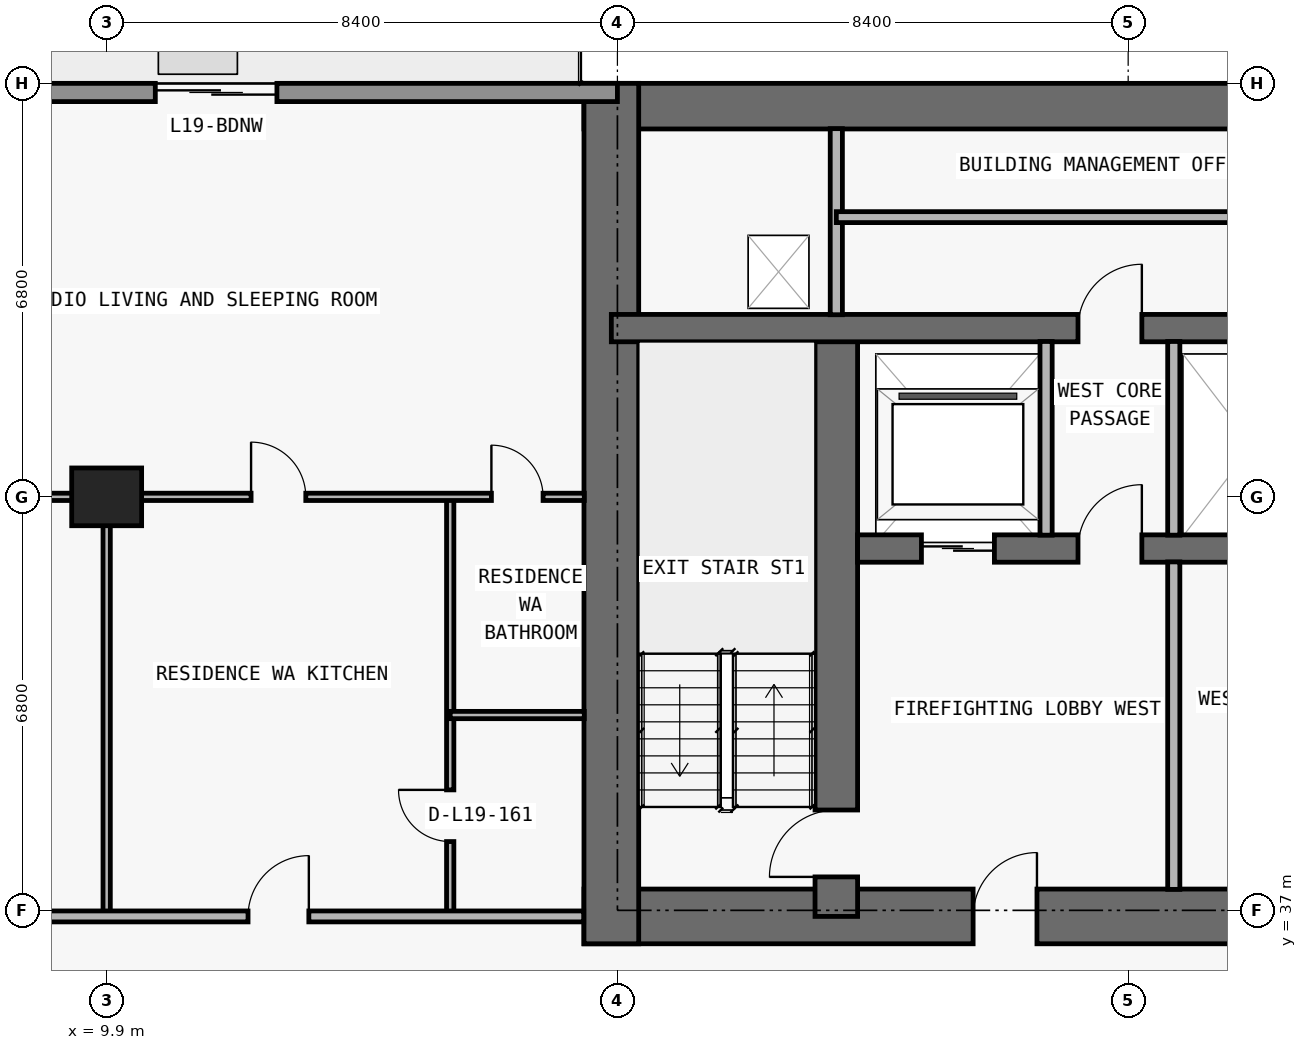
"""IFC4 building model, lengths in metres.
Left out: names, types, materials, properties, quantities, classifications, styles, units other than length and angle.
Written with IfcOpenShell. Run it as: python <this file> out.ifc"""

import sys

from ifc_helpers import new_model, si_unit, direction, frame, frame_2d, origin, origin_2d, place, context, subcontext, project, spatial, rectangle, extrude, element, fill, save


model = new_model("IFC4")
c1 = context("Model", 3, precision=1e-05, world=origin(), true_north=direction((0.0, 1.0)))
c2 = subcontext(c1, "Body", "Model", "MODEL_VIEW")
j1 = project(units=[si_unit("LENGTHUNIT", "METRE"), si_unit("PLANEANGLEUNIT", "RADIAN")], contexts=[c1])
p1 = place(None, origin())
s1 = spatial("IfcSite", under=j1, at=p1, CompositionType="ELEMENT")
p2 = place(p1, origin())
s2 = spatial("IfcBuilding", under=s1, at=p2, CompositionType="ELEMENT")
p3 = place(p2, frame((0.0, 0.0, 72.9)))
s3 = spatial("IfcBuildingStorey", under=s2, at=p3, CompositionType="ELEMENT", Elevation=72.9)
p4 = place(p3, frame((9.9, 43.8, 0.0), z_axis=(0.0, 0.0, 1.0), x_axis=(1.0, 0.0, 0.0)))
e1 = element("IfcColumn", 1, at=p4, inside=s3, PredefinedType="COLUMN", context=c2, shape_type="SweptSolid", body=[
    extrude(rectangle(XDim=1.15, YDim=0.95, at=origin_2d()), origin(), (0.0, 0.0, 1.0), 3.05),
])
p5 = place(p3, frame((17.75, 36.9, 0.0), z_axis=(0.0, 0.0, 1.0), x_axis=(1.0, 0.0, 0.0)))
e2 = element("IfcWall", 2, at=p5, inside=s3, PredefinedType="SHEAR", context=c2, shape_type="SweptSolid", body=[
    extrude(rectangle(XDim=42.3, YDim=0.9, at=frame_2d((21.15, 0.0))), origin(), (0.0, 0.0, 1.0), 3.05),
])
p6 = place(p5, frame((14.55, 0.0, 0.0)))
e3 = element("IfcOpeningElement", 3, at=p6, cuts=e2, PredefinedType="OPENING", context=c2, shape_type="SweptSolid", body=[
    extrude(rectangle(XDim=1.1, YDim=2.15, at=frame_2d((0.55, 1.075))), frame((0.0, 0.46, 0.0), z_axis=(0.0, -1.0, 0.0), x_axis=(1.0, 0.0, 0.0)), (0.0, 0.0, 1.0), 0.92),
])
p7 = place(p5, frame((6.4, 0.0, 0.0)))
e4 = element("IfcOpeningElement", 4, at=p7, cuts=e2, PredefinedType="OPENING", context=c2, shape_type="SweptSolid", body=[
    extrude(rectangle(XDim=1.05, YDim=2.15, at=frame_2d((0.525, 1.075))), frame((0.0, 0.46, 0.0), z_axis=(0.0, -1.0, 0.0), x_axis=(1.0, 0.0, 0.0)), (0.0, 0.0, 1.0), 0.92),
])
p8 = place(p5, frame((34.9, 0.0, 0.0)))
e5 = element("IfcOpeningElement", 5, at=p8, cuts=e2, PredefinedType="OPENING", context=c2, shape_type="SweptSolid", body=[
    extrude(rectangle(XDim=1.05, YDim=2.15, at=frame_2d((0.525, 1.075))), frame((0.0, 0.46, 0.0), z_axis=(0.0, -1.0, 0.0), x_axis=(1.0, 0.0, 0.0)), (0.0, 0.0, 1.0), 0.92),
])
p9 = place(p5, frame((11.012, 0.0, 0.0)))
e6 = element("IfcOpeningElement", 6, at=p9, cuts=e2, PredefinedType="OPENING", context=c2, shape_type="SweptSolid", body=[
    extrude(rectangle(XDim=1.05, YDim=2.15, at=frame_2d((0.525, 1.075))), frame((0.0, 0.46, 0.0), z_axis=(0.0, -1.0, 0.0), x_axis=(1.0, 0.0, 0.0)), (0.0, 0.0, 1.0), 0.92),
])
p10 = place(p5, frame((24.25, 0.0, 0.0)))
e7 = element("IfcOpeningElement", 7, at=p10, cuts=e2, PredefinedType="OPENING", context=c2, shape_type="SweptSolid", body=[
    extrude(rectangle(XDim=1.05, YDim=2.15, at=frame_2d((0.525, 1.075))), frame((0.0, 0.46, 0.0), z_axis=(0.0, -1.0, 0.0), x_axis=(1.0, 0.0, 0.0)), (0.0, 0.0, 1.0), 0.92),
])
p11 = place(p3, frame((17.75, 50.225, 0.0), z_axis=(0.0, 0.0, 1.0), x_axis=(1.0, 0.0, 0.0)))
e8 = element("IfcWall", 8, at=p11, inside=s3, PredefinedType="SHEAR", context=c2, shape_type="SweptSolid", body=[
    extrude(rectangle(XDim=42.3, YDim=0.75, at=frame_2d((21.15, 0.0))), origin(), (0.0, 0.0, 1.0), 3.05),
])
p12 = place(p3, frame((18.2, 36.45, 0.0), z_axis=(0.0, 0.0, 1.0), x_axis=(0.0, 1.0, 0.0)))
e9 = element("IfcWall", 9, at=p12, inside=s3, PredefinedType="SHEAR", context=c2, shape_type="SweptSolid", body=[
    extrude(rectangle(XDim=14.15, YDim=0.9, at=frame_2d((7.075, 0.0))), origin(), (0.0, 0.0, 1.0), 3.05),
])
p13 = place(p3, frame((21.9, 36.9, 0.0), z_axis=(0.0, 0.0, 1.0), x_axis=(0.0, 1.0, 0.0)))
e10 = element("IfcWall", 10, at=p13, inside=s3, PredefinedType="SHEAR", context=c2, shape_type="SweptSolid", body=[
    extrude(rectangle(XDim=9.675, YDim=0.7, at=frame_2d((4.837, 0.0))), origin(), (0.0, 0.0, 1.0), 3.05),
])
p14 = place(p13, frame((0.65, 0.0, 0.0)))
e11 = element("IfcOpeningElement", 11, at=p14, cuts=e10, PredefinedType="OPENING", context=c2, shape_type="SweptSolid", body=[
    extrude(rectangle(XDim=1.1, YDim=2.15, at=frame_2d((0.55, 1.075))), frame((0.0, 0.36, 0.0), z_axis=(0.0, -1.0, 0.0), x_axis=(1.0, 0.0, 0.0)), (0.0, 0.0, 1.0), 0.72),
])
p15 = place(p3, frame((22.25, 42.95, 0.0), z_axis=(0.0, 0.0, 1.0), x_axis=(1.0, 0.0, 0.0)))
e12 = element("IfcWall", 12, at=p15, inside=s3, PredefinedType="SHEAR", context=c2, shape_type="SweptSolid", body=[
    extrude(rectangle(XDim=33.3, YDim=0.45, at=frame_2d((16.65, 0.0))), origin(), (0.0, 0.0, 1.0), 3.05),
])
p16 = place(p15, frame((1.05, 0.0, 0.0)))
e13 = element("IfcOpeningElement", 13, at=p16, cuts=e12, PredefinedType="OPENING", context=c2, shape_type="SweptSolid", body=[
    extrude(rectangle(XDim=1.2, YDim=2.2, at=frame_2d((0.6, 1.1))), frame((0.0, 0.235, 0.0), z_axis=(0.0, -1.0, 0.0), x_axis=(1.0, 0.0, 0.0)), (0.0, 0.0, 1.0), 0.47),
])
p17 = place(p15, frame((31.05, 0.0, 0.0)))
e14 = element("IfcOpeningElement", 14, at=p17, cuts=e12, PredefinedType="OPENING", context=c2, shape_type="SweptSolid", body=[
    extrude(rectangle(XDim=1.2, YDim=2.2, at=frame_2d((0.6, 1.1))), frame((0.0, 0.235, 0.0), z_axis=(0.0, -1.0, 0.0), x_axis=(1.0, 0.0, 0.0)), (0.0, 0.0, 1.0), 0.47),
])
p18 = place(p15, frame((13.5, 0.0, 0.0)))
e15 = element("IfcOpeningElement", 15, at=p18, cuts=e12, PredefinedType="OPENING", context=c2, shape_type="SweptSolid", body=[
    extrude(rectangle(XDim=1.1, YDim=2.2, at=frame_2d((0.55, 1.1))), frame((0.0, 0.235, 0.0), z_axis=(0.0, -1.0, 0.0), x_axis=(1.0, 0.0, 0.0)), (0.0, 0.0, 1.0), 0.47),
])
p19 = place(p15, frame((16.1, 0.0, 0.0)))
e16 = element("IfcOpeningElement", 16, at=p19, cuts=e12, PredefinedType="OPENING", context=c2, shape_type="SweptSolid", body=[
    extrude(rectangle(XDim=1.1, YDim=2.2, at=frame_2d((0.55, 1.1))), frame((0.0, 0.235, 0.0), z_axis=(0.0, -1.0, 0.0), x_axis=(1.0, 0.0, 0.0)), (0.0, 0.0, 1.0), 0.47),
])
p20 = place(p15, frame((18.7, 0.0, 0.0)))
e17 = element("IfcOpeningElement", 17, at=p20, cuts=e12, PredefinedType="OPENING", context=c2, shape_type="SweptSolid", body=[
    extrude(rectangle(XDim=1.1, YDim=2.2, at=frame_2d((0.55, 1.1))), frame((0.0, 0.235, 0.0), z_axis=(0.0, -1.0, 0.0), x_axis=(1.0, 0.0, 0.0)), (0.0, 0.0, 1.0), 0.47),
])
p21 = place(p15, frame((3.625, 0.0, 0.0)))
e18 = element("IfcOpeningElement", 18, at=p21, cuts=e12, PredefinedType="OPENING", context=c2, shape_type="SweptSolid", body=[
    extrude(rectangle(XDim=1.05, YDim=2.15, at=frame_2d((0.525, 1.075))), frame((0.0, 0.235, 0.0), z_axis=(0.0, -1.0, 0.0), x_axis=(1.0, 0.0, 0.0)), (0.0, 0.0, 1.0), 0.47),
])
p22 = place(p15, frame((28.675, 0.0, 0.0)))
e19 = element("IfcOpeningElement", 19, at=p22, cuts=e12, PredefinedType="OPENING", context=c2, shape_type="SweptSolid", body=[
    extrude(rectangle(XDim=1.05, YDim=2.15, at=frame_2d((0.525, 1.075))), frame((0.0, 0.235, 0.0), z_axis=(0.0, -1.0, 0.0), x_axis=(1.0, 0.0, 0.0)), (0.0, 0.0, 1.0), 0.47),
])
p23 = place(p3, frame((18.2, 46.575, 0.0), z_axis=(0.0, 0.0, 1.0), x_axis=(1.0, 0.0, 0.0)))
e20 = element("IfcWall", 20, at=p23, inside=s3, PredefinedType="SHEAR", context=c2, shape_type="SweptSolid", body=[
    extrude(rectangle(XDim=41.4, YDim=0.45, at=frame_2d((20.7, 0.0))), origin(), (0.0, 0.0, 1.0), 3.05),
])
p24 = place(p23, frame((7.675, 0.0, 0.0)))
e21 = element("IfcOpeningElement", 21, at=p24, cuts=e20, PredefinedType="OPENING", context=c2, shape_type="SweptSolid", body=[
    extrude(rectangle(XDim=1.05, YDim=2.15, at=frame_2d((0.525, 1.075))), frame((0.0, 0.235, 0.0), z_axis=(0.0, -1.0, 0.0), x_axis=(1.0, 0.0, 0.0)), (0.0, 0.0, 1.0), 0.47),
])
p25 = place(p23, frame((32.725, 0.0, 0.0)))
e22 = element("IfcOpeningElement", 22, at=p25, cuts=e20, PredefinedType="OPENING", context=c2, shape_type="SweptSolid", body=[
    extrude(rectangle(XDim=1.05, YDim=2.15, at=frame_2d((0.525, 1.075))), frame((0.0, 0.235, 0.0), z_axis=(0.0, -1.0, 0.0), x_axis=(1.0, 0.0, 0.0)), (0.0, 0.0, 1.0), 0.47),
])
p26 = place(p3, frame((5.1, 50.45, 0.0), z_axis=(0.0, 0.0, 1.0), x_axis=(1.0, 0.0, 0.0)))
e23 = element("IfcWall", 23, at=p26, inside=s3, PredefinedType="STANDARD", context=c2, shape_type="SweptSolid", body=[
    extrude(rectangle(XDim=13.2, YDim=0.3, at=frame_2d((6.6, 0.0))), origin(), (0.0, 0.0, 1.0), 3.05),
])
p27 = place(p26, frame((5.6, 0.0, 0.0)))
e24 = element("IfcOpeningElement", 24, at=p27, cuts=e23, PredefinedType="OPENING", context=c2, shape_type="SweptSolid", body=[
    extrude(rectangle(XDim=2.0, YDim=2.3, at=frame_2d((1.0, 1.15))), frame((0.0, 0.16, 0.0), z_axis=(0.0, -1.0, 0.0), x_axis=(1.0, 0.0, 0.0)), (0.0, 0.0, 1.0), 0.32),
])
p28 = place(p3, frame((9.9, 36.9, 0.0), z_axis=(0.0, 0.0, 1.0), x_axis=(0.0, 1.0, 0.0)))
e25 = element("IfcWall", 25, at=p28, inside=s3, PredefinedType="PARTITIONING", context=c2, shape_type="SweptSolid", body=[
    extrude(rectangle(XDim=6.9, YDim=0.12, at=frame_2d((3.45, 0.0))), origin(), (0.0, 0.0, 1.0), 2.11),
])
p29 = place(p3, frame((15.55, 36.9, 0.0), z_axis=(0.0, 0.0, 1.0), x_axis=(0.0, 1.0, 0.0)))
e26 = element("IfcWall", 26, at=p29, inside=s3, PredefinedType="PARTITIONING", context=c2, shape_type="SweptSolid", body=[
    extrude(rectangle(XDim=6.9, YDim=0.12, at=frame_2d((3.45, 0.0))), origin(), (0.0, 0.0, 1.0), 3.05),
])
p30 = place(p29, frame((1.231, 0.0, 0.0)))
e27 = element("IfcOpeningElement", 27, at=p30, cuts=e26, PredefinedType="OPENING", context=c2, shape_type="SweptSolid", body=[
    extrude(rectangle(XDim=0.85, YDim=2.1, at=frame_2d((0.425, 1.05))), frame((0.0, 0.07, 0.0), z_axis=(0.0, -1.0, 0.0), x_axis=(1.0, 0.0, 0.0)), (0.0, 0.0, 1.0), 0.14),
])
p31 = place(p3, frame((21.9, 46.795, 0.0), z_axis=(0.0, 0.0, 1.0), x_axis=(0.0, 1.0, 0.0)))
e28 = element("IfcWall", 28, at=p31, inside=s3, PredefinedType="PARTITIONING", context=c2, shape_type="SweptSolid", body=[
    extrude(rectangle(XDim=3.06, YDim=0.2, at=frame_2d((1.53, 0.0))), origin(), (0.0, 0.0, 1.0), 3.05),
])
p32 = place(p3, frame((25.35, 43.17, 0.0), z_axis=(0.0, 0.0, 1.0), x_axis=(0.0, 1.0, 0.0)))
e29 = element("IfcWall", 29, at=p32, inside=s3, PredefinedType="PARTITIONING", context=c2, shape_type="SweptSolid", body=[
    extrude(rectangle(XDim=3.185, YDim=0.2, at=frame_2d((1.593, 0.0))), origin(), (0.0, 0.0, 1.0), 3.05),
])
p33 = place(p3, frame((27.45, 37.345, 0.0), z_axis=(0.0, 0.0, 1.0), x_axis=(0.0, 1.0, 0.0)))
e30 = element("IfcWall", 30, at=p33, inside=s3, PredefinedType="PARTITIONING", context=c2, shape_type="SweptSolid", body=[
    extrude(rectangle(XDim=5.385, YDim=0.2, at=frame_2d((2.692, 0.0))), origin(), (0.0, 0.0, 1.0), 3.05),
])
p34 = place(p3, frame((27.45, 43.17, 0.0), z_axis=(0.0, 0.0, 1.0), x_axis=(0.0, 1.0, 0.0)))
e31 = element("IfcWall", 31, at=p34, inside=s3, PredefinedType="PARTITIONING", context=c2, shape_type="SweptSolid", body=[
    extrude(rectangle(XDim=3.185, YDim=0.2, at=frame_2d((1.593, 0.0))), origin(), (0.0, 0.0, 1.0), 3.05),
])
p35 = place(p3, frame((5.1, 36.9, 0.0), z_axis=(0.0, 0.0, 1.0), x_axis=(1.0, 0.0, 0.0)))
e32 = element("IfcWall", 32, at=p35, inside=s3, PredefinedType="PARTITIONING", context=c2, shape_type="SweptSolid", body=[
    extrude(rectangle(XDim=12.645, YDim=0.18, at=frame_2d((6.323, 0.0))), origin(), (0.0, 0.0, 1.0), 3.05),
])
p36 = place(p35, frame((7.125, 0.0, 0.0)))
e33 = element("IfcOpeningElement", 33, at=p36, cuts=e32, PredefinedType="OPENING", context=c2, shape_type="SweptSolid", body=[
    extrude(rectangle(XDim=1.0, YDim=2.2, at=frame_2d((0.5, 1.1))), frame((0.0, 0.1, 0.0), z_axis=(0.0, -1.0, 0.0), x_axis=(1.0, 0.0, 0.0)), (0.0, 0.0, 1.0), 0.2),
])
p37 = place(p3, frame((15.55, 40.212, 0.0), z_axis=(0.0, 0.0, 1.0), x_axis=(1.0, 0.0, 0.0)))
e34 = element("IfcWall", 34, at=p37, inside=s3, PredefinedType="PARTITIONING", context=c2, shape_type="SweptSolid", body=[
    extrude(rectangle(XDim=2.205, YDim=0.12, at=frame_2d((1.103, 0.0))), origin(), (0.0, 0.0, 1.0), 3.05),
])
p38 = place(p3, frame((1.795, 43.8, 0.0), z_axis=(0.0, 0.0, 1.0), x_axis=(1.0, 0.0, 0.0)))
e35 = element("IfcWall", 35, at=p38, inside=s3, PredefinedType="PARTITIONING", context=c2, shape_type="SweptSolid", body=[
    extrude(rectangle(XDim=15.96, YDim=0.12, at=frame_2d((7.98, 0.0))), origin(), (0.0, 0.0, 1.0), 2.339),
])
p39 = place(p38, frame((5.255, 0.0, 0.0)))
e36 = element("IfcOpeningElement", 36, at=p39, cuts=e35, PredefinedType="OPENING", context=c2, shape_type="SweptSolid", body=[
    extrude(rectangle(XDim=0.9, YDim=2.15, at=frame_2d((0.45, 1.075))), frame((0.0, 0.07, 0.0), z_axis=(0.0, -1.0, 0.0), x_axis=(1.0, 0.0, 0.0)), (0.0, 0.0, 1.0), 0.14),
])
p40 = place(p38, frame((10.48, 0.0, 0.0)))
e37 = element("IfcOpeningElement", 37, at=p40, cuts=e35, PredefinedType="OPENING", context=c2, shape_type="SweptSolid", body=[
    extrude(rectangle(XDim=0.9, YDim=2.15, at=frame_2d((0.45, 1.075))), frame((0.0, 0.07, 0.0), z_axis=(0.0, -1.0, 0.0), x_axis=(1.0, 0.0, 0.0)), (0.0, 0.0, 1.0), 0.14),
])
p41 = place(p38, frame((14.433, 0.0, 0.0)))
e38 = element("IfcOpeningElement", 38, at=p41, cuts=e35, PredefinedType="OPENING", context=c2, shape_type="SweptSolid", body=[
    extrude(rectangle(XDim=0.85, YDim=2.1, at=frame_2d((0.425, 1.05))), frame((0.0, 0.07, 0.0), z_axis=(0.0, -1.0, 0.0), x_axis=(1.0, 0.0, 0.0)), (0.0, 0.0, 1.0), 0.14),
])
p42 = place(p3, frame((21.9, 48.4, 0.0), z_axis=(0.0, 0.0, 1.0), x_axis=(1.0, 0.0, 0.0)))
e39 = element("IfcWall", 39, at=p42, inside=s3, PredefinedType="PARTITIONING", context=c2, shape_type="SweptSolid", body=[
    extrude(rectangle(XDim=34.0, YDim=0.18, at=frame_2d((17.0, 0.0))), origin(), (0.0, 0.0, 1.0), 3.05),
])
p43 = place(p42, frame((8.0, 0.0, 0.0)))
e40 = element("IfcOpeningElement", 40, at=p43, cuts=e39, PredefinedType="OPENING", context=c2, shape_type="SweptSolid", body=[
    extrude(rectangle(XDim=1.0, YDim=2.2, at=frame_2d((0.5, 1.1))), frame((0.0, 0.1, 0.0), z_axis=(0.0, -1.0, 0.0), x_axis=(1.0, 0.0, 0.0)), (0.0, 0.0, 1.0), 0.2),
])
p44 = place(p42, frame((25.0, 0.0, 0.0)))
e41 = element("IfcOpeningElement", 41, at=p44, cuts=e39, PredefinedType="OPENING", context=c2, shape_type="SweptSolid", body=[
    extrude(rectangle(XDim=1.0, YDim=2.2, at=frame_2d((0.5, 1.1))), frame((0.0, 0.1, 0.0), z_axis=(0.0, -1.0, 0.0), x_axis=(1.0, 0.0, 0.0)), (0.0, 0.0, 1.0), 0.2),
])
p45 = place(p27, origin())
e42 = element("IfcDoor", 42, at=p45, inside=s3, OperationType="DOUBLE_DOOR_SLIDING", PredefinedType="DOOR", context=c2, shape_type="SweptSolid", body=[
    extrude(rectangle(XDim=2.0, YDim=2.3, at=frame_2d((1.0, 1.15))), frame((0.0, 0.025, 0.0), z_axis=(0.0, -1.0, 0.0), x_axis=(1.0, 0.0, 0.0)), (0.0, 0.0, 1.0), 0.05),
])
fill(e24, e42)
p46 = place(p16, origin())
e43 = element("IfcDoor", 43, at=p46, inside=s3, OperationType="DOUBLE_DOOR_SLIDING", PredefinedType="DOOR", context=c2, shape_type="SweptSolid", body=[
    extrude(rectangle(XDim=1.2, YDim=2.2, at=frame_2d((0.6, 1.1))), frame((0.0, 0.025, 0.0), z_axis=(0.0, -1.0, 0.0), x_axis=(1.0, 0.0, 0.0)), (0.0, 0.0, 1.0), 0.05),
])
fill(e13, e43)
p47 = place(p7, origin())
e44 = element("IfcDoor", 44, at=p47, inside=s3, OperationType="SINGLE_SWING_RIGHT", PredefinedType="DOOR", context=c2, shape_type="SweptSolid", body=[
    extrude(rectangle(XDim=1.05, YDim=2.15, at=frame_2d((0.525, 1.075))), frame((0.0, 0.025, 0.0), z_axis=(0.0, -1.0, 0.0), x_axis=(1.0, 0.0, 0.0)), (0.0, 0.0, 1.0), 0.05),
])
fill(e4, e44)
p48 = place(p14, origin())
e45 = element("IfcDoor", 45, at=p48, inside=s3, OperationType="SINGLE_SWING_LEFT", PredefinedType="DOOR", context=c2, shape_type="SweptSolid", body=[
    extrude(rectangle(XDim=1.1, YDim=2.15, at=frame_2d((0.55, 1.075))), frame((0.0, 0.025, 0.0), z_axis=(0.0, -1.0, 0.0), x_axis=(1.0, 0.0, 0.0)), (0.0, 0.0, 1.0), 0.05),
])
fill(e11, e45)
p49 = place(p21, origin())
e46 = element("IfcDoor", 46, at=p49, inside=s3, OperationType="SINGLE_SWING_RIGHT", PredefinedType="DOOR", context=c2, shape_type="SweptSolid", body=[
    extrude(rectangle(XDim=1.05, YDim=2.15, at=frame_2d((0.525, 1.075))), frame((0.0, 0.025, 0.0), z_axis=(0.0, -1.0, 0.0), x_axis=(1.0, 0.0, 0.0)), (0.0, 0.0, 1.0), 0.05),
])
fill(e18, e46)
p50 = place(p24, origin())
e47 = element("IfcDoor", 47, at=p50, inside=s3, OperationType="SINGLE_SWING_RIGHT", PredefinedType="DOOR", context=c2, shape_type="SweptSolid", body=[
    extrude(rectangle(XDim=1.05, YDim=2.15, at=frame_2d((0.525, 1.075))), frame((0.0, 0.025, 0.0), z_axis=(0.0, -1.0, 0.0), x_axis=(1.0, 0.0, 0.0)), (0.0, 0.0, 1.0), 0.05),
])
fill(e21, e47)
p51 = place(p36, origin())
e48 = element("IfcDoor", 48, at=p51, inside=s3, OperationType="SINGLE_SWING_RIGHT", PredefinedType="DOOR", context=c2, shape_type="SweptSolid", body=[
    extrude(rectangle(XDim=1.0, YDim=2.2, at=frame_2d((0.5, 1.1))), frame((0.0, 0.025, 0.0), z_axis=(0.0, -1.0, 0.0), x_axis=(1.0, 0.0, 0.0)), (0.0, 0.0, 1.0), 0.05),
])
fill(e33, e48)
p52 = place(p40, origin())
e49 = element("IfcDoor", 49, at=p52, inside=s3, OperationType="SINGLE_SWING_LEFT", PredefinedType="DOOR", context=c2, shape_type="SweptSolid", body=[
    extrude(rectangle(XDim=0.9, YDim=2.15, at=frame_2d((0.45, 1.075))), frame((0.0, 0.025, 0.0), z_axis=(0.0, -1.0, 0.0), x_axis=(1.0, 0.0, 0.0)), (0.0, 0.0, 1.0), 0.05),
])
fill(e37, e49)
p53 = place(p30, origin())
e50 = element("IfcDoor", 50, at=p53, inside=s3, OperationType="SINGLE_SWING_RIGHT", PredefinedType="DOOR", context=c2, shape_type="SweptSolid", body=[
    extrude(rectangle(XDim=0.85, YDim=2.1, at=frame_2d((0.425, 1.05))), frame((0.0, 0.025, 0.0), z_axis=(0.0, -1.0, 0.0), x_axis=(1.0, 0.0, 0.0)), (0.0, 0.0, 1.0), 0.05),
])
fill(e27, e50)
p54 = place(p41, origin())
e51 = element("IfcDoor", 51, at=p54, inside=s3, OperationType="SINGLE_SWING_LEFT", PredefinedType="DOOR", context=c2, shape_type="SweptSolid", body=[
    extrude(rectangle(XDim=0.85, YDim=2.1, at=frame_2d((0.425, 1.05))), frame((0.0, 0.025, 0.0), z_axis=(0.0, -1.0, 0.0), x_axis=(1.0, 0.0, 0.0)), (0.0, 0.0, 1.0), 0.05),
])
fill(e38, e51)
save(model, sys.argv[1])
